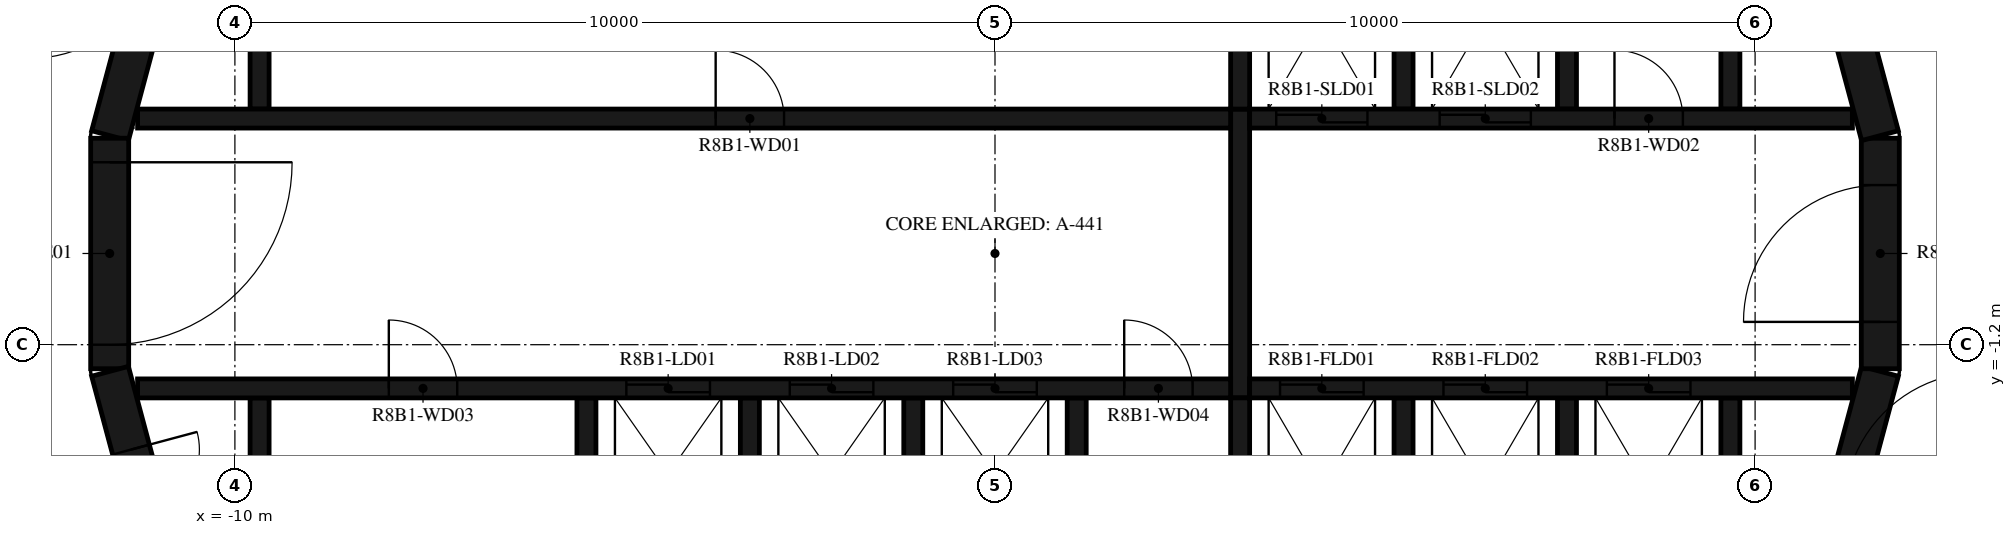
"""IFC4 building model, lengths in metres.
Left out: names, types, materials, properties, quantities, classifications, styles, units other than length and angle.
Written with IfcOpenShell. Run it as: python <this file> out.ifc"""

import sys

from ifc_helpers import new_model, si_unit, direction, frame, frame_2d, origin, place, context, subcontext, project, spatial, polyline, rectangle, outline, extrude, element, fill, save


model = new_model("IFC4")
c1 = context("Model", 3, precision=1e-05, world=origin(), true_north=direction((0.0, 1.0)))
c2 = subcontext(c1, "Body", "Model", "MODEL_VIEW")
j1 = project(units=[si_unit("LENGTHUNIT", "METRE"), si_unit("PLANEANGLEUNIT", "RADIAN")], contexts=[c1])
p1 = place(None, origin())
s1 = spatial("IfcSite", under=j1, at=p1, CompositionType="ELEMENT")
p2 = place(p1, origin())
s2 = spatial("IfcBuilding", under=s1, at=p2, CompositionType="ELEMENT")
p3 = place(p2, frame((0.0, 0.0, 308.7)))
s3 = spatial("IfcBuildingStorey", under=s2, at=p3, CompositionType="ELEMENT", Elevation=308.7)
p4 = place(p3, frame((10.858, -4.479, 0.0), z_axis=(0.0, 0.0, 1.0), x_axis=(0.258734743916, 0.965948410781, 0.0)))
e1 = element("IfcWall", 1, at=p4, inside=s3, PredefinedType="SHEAR", context=c2, shape_type="SweptSolid", body=[
    extrude(rectangle(XDim=3.033, YDim=0.5, at=frame_2d((1.516, 0.0))), origin(), (0.0, 0.0, 1.0), 3.12),
])
p5 = place(p3, frame((11.647, -1.516, 0.0), z_axis=(0.0, 0.0, 1.0), x_axis=(0.0, 1.0, 0.0)))
e2 = element("IfcWall", 2, at=p5, inside=s3, PredefinedType="SHEAR", context=c2, shape_type="SweptSolid", body=[
    extrude(rectangle(XDim=3.033, YDim=0.5, at=frame_2d((1.516, 0.0))), origin(), (0.0, 0.0, 1.0), 3.12),
])
p6 = place(p5, frame((0.616, 0.0, 0.0)))
e3 = element("IfcOpeningElement", 3, at=p6, cuts=e2, PredefinedType="OPENING", context=c2, shape_type="SweptSolid", body=[
    extrude(rectangle(XDim=1.8, YDim=2.1, at=frame_2d((0.9, 1.05))), frame((0.0, 0.26, 0.0), z_axis=(0.0, -1.0, 0.0), x_axis=(1.0, 0.0, 0.0)), (0.0, 0.0, 1.0), 0.52),
])
for number, where, z_axis, x_axis in (
    (4, (11.643, 1.55, 0.0), (0.0, 0.0, 1.0), (-0.259, 0.966, 0.0)),
    (5, (-10.858, 4.479, 0.0), (0.0, 0.0, 1.0), (-0.259, -0.966, 0.0)),
):
    element("IfcWall", number, at=place(p3, frame(where, z_axis=z_axis, x_axis=x_axis)), inside=s3, PredefinedType="SHEAR", context=c2, shape_type="SweptSolid", body=[
        extrude(rectangle(XDim=3.033, YDim=0.5, at=frame_2d((1.516, 0.0))), origin(), (0.0, 0.0, 1.0), 3.12),
    ])
p7 = place(p3, frame((-11.647, 1.516, 0.0), z_axis=(0.0, 0.0, 1.0), x_axis=(0.0, -1.0, 0.0)))
e6 = element("IfcWall", 6, at=p7, inside=s3, PredefinedType="SHEAR", context=c2, shape_type="SweptSolid", body=[
    extrude(rectangle(XDim=3.033, YDim=0.5, at=frame_2d((1.516, 0.0))), origin(), (0.0, 0.0, 1.0), 3.12),
])
p8 = place(p7, frame((0.316, 0.0, 0.0)))
e7 = element("IfcOpeningElement", 7, at=p8, cuts=e6, PredefinedType="OPENING", context=c2, shape_type="SweptSolid", body=[
    extrude(rectangle(XDim=2.4, YDim=2.1, at=frame_2d((1.2, 1.05))), frame((0.0, 0.26, 0.0), z_axis=(0.0, -1.0, 0.0), x_axis=(1.0, 0.0, 0.0)), (0.0, 0.0, 1.0), 0.52),
])
p9 = place(p3, frame((-11.643, -1.55, 0.0), z_axis=(0.0, 0.0, 1.0), x_axis=(0.258734743916, -0.965948410781, 0.0)))
e8 = element("IfcWall", 8, at=p9, inside=s3, PredefinedType="SHEAR", context=c2, shape_type="SweptSolid", body=[
    extrude(rectangle(XDim=3.033, YDim=0.5, at=frame_2d((1.516, 0.0))), origin(), (0.0, 0.0, 1.0), 3.12),
])
p10 = place(p9, frame((1.066, 0.0, 0.0)))
e9 = element("IfcOpeningElement", 9, at=p10, cuts=e8, PredefinedType="OPENING", context=c2, shape_type="SweptSolid", body=[
    extrude(rectangle(XDim=0.9, YDim=2.1, at=frame_2d((0.45, 1.05))), frame((0.0, 0.26, 0.0), z_axis=(0.0, -1.0, 0.0), x_axis=(1.0, 0.0, 0.0)), (0.0, 0.0, 1.0), 0.52),
])
p11 = place(p3, origin())
e10 = element("IfcWall", 10, at=p11, inside=s3, PredefinedType="SHEAR", context=c2, shape_type="SweptSolid", body=[
    extrude(outline(polyline([(-9.8, 1.9), (-9.55, 1.9), (-9.55, 4.8), (3.1, 4.8), (3.1, 1.9), (3.35, 1.9), (3.35, 4.8), (5.25, 4.8), (5.25, 1.9), (5.5, 1.9), (5.5, 4.8), (7.4, 4.8), (7.4, 1.9), (7.65, 1.9), (7.65, 4.8), (9.55, 4.8), (9.55, 1.9), (9.8, 1.9), (9.8, 4.8), (9.8, 5.05), (-9.8, 5.05), (-9.8, 4.8), (-9.8, 1.9)])), origin(), (0.0, 0.0, 1.0), 3.12),
])
p12 = place(p3, origin())
e11 = element("IfcWall", 11, at=p12, inside=s3, PredefinedType="SHEAR", context=c2, shape_type="SweptSolid", body=[
    extrude(outline(polyline([(9.8, -5.05), (9.8, -4.8), (9.8, -1.9), (9.55, -1.9), (9.55, -4.8), (7.65, -4.8), (7.65, -1.9), (7.4, -1.9), (7.4, -4.8), (5.5, -4.8), (5.5, -1.9), (5.25, -1.9), (5.25, -4.8), (3.35, -4.8), (3.35, -1.9), (3.1, -1.9), (3.1, -4.8), (1.2, -4.8), (1.2, -1.9), (0.95, -1.9), (0.95, -4.8), (-0.95, -4.8), (-0.95, -1.9), (-1.2, -1.9), (-1.2, -4.8), (-3.1, -4.8), (-3.1, -1.9), (-3.35, -1.9), (-3.35, -4.8), (-5.25, -4.8), (-5.25, -1.9), (-5.5, -1.9), (-5.5, -4.8), (-9.55, -4.8), (-9.55, -1.9), (-9.8, -1.9), (-9.8, -4.8), (-9.8, -5.05), (9.8, -5.05)])), origin(), (0.0, 0.0, 1.0), 3.12),
])
p13 = place(p3, frame((-11.28, 1.775, 0.0), z_axis=(0.0, 0.0, 1.0), x_axis=(1.0, 0.0, 0.0)))
e12 = element("IfcWall", 12, at=p13, inside=s3, PredefinedType="SHEAR", context=c2, shape_type="SweptSolid", body=[
    extrude(rectangle(XDim=14.38, YDim=0.25, at=frame_2d((7.19, 0.0))), origin(), (0.0, 0.0, 1.0), 3.12),
])
p14 = place(p13, frame((7.605, 0.0, 0.0)))
e13 = element("IfcOpeningElement", 13, at=p14, cuts=e12, PredefinedType="OPENING", context=c2, shape_type="SweptSolid", body=[
    extrude(rectangle(XDim=0.9, YDim=2.1, at=frame_2d((0.45, 1.05))), frame((0.0, 0.135, 0.0), z_axis=(0.0, -1.0, 0.0), x_axis=(1.0, 0.0, 0.0)), (0.0, 0.0, 1.0), 0.27),
])
p15 = place(p3, frame((3.35, 1.775, 0.0), z_axis=(0.0, 0.0, 1.0), x_axis=(1.0, 0.0, 0.0)))
e14 = element("IfcWall", 14, at=p15, inside=s3, PredefinedType="SHEAR", context=c2, shape_type="SweptSolid", body=[
    extrude(rectangle(XDim=7.93, YDim=0.25, at=frame_2d((3.965, 0.0))), origin(), (0.0, 0.0, 1.0), 3.12),
])
p16 = place(p15, frame((0.35, 0.0, 0.0)))
e15 = element("IfcOpeningElement", 15, at=p16, cuts=e14, PredefinedType="OPENING", context=c2, shape_type="SweptSolid", body=[
    extrude(rectangle(XDim=1.2, YDim=2.4, at=frame_2d((0.6, 1.2))), frame((0.0, 0.135, 0.0), z_axis=(0.0, -1.0, 0.0), x_axis=(1.0, 0.0, 0.0)), (0.0, 0.0, 1.0), 0.27),
])
p17 = place(p15, frame((2.5, 0.0, 0.0)))
e16 = element("IfcOpeningElement", 16, at=p17, cuts=e14, PredefinedType="OPENING", context=c2, shape_type="SweptSolid", body=[
    extrude(rectangle(XDim=1.2, YDim=2.4, at=frame_2d((0.6, 1.2))), frame((0.0, 0.135, 0.0), z_axis=(0.0, -1.0, 0.0), x_axis=(1.0, 0.0, 0.0)), (0.0, 0.0, 1.0), 0.27),
])
p18 = place(p15, frame((4.8, 0.0, 0.0)))
e17 = element("IfcOpeningElement", 17, at=p18, cuts=e14, PredefinedType="OPENING", context=c2, shape_type="SweptSolid", body=[
    extrude(rectangle(XDim=0.9, YDim=2.1, at=frame_2d((0.45, 1.05))), frame((0.0, 0.135, 0.0), z_axis=(0.0, -1.0, 0.0), x_axis=(1.0, 0.0, 0.0)), (0.0, 0.0, 1.0), 0.27),
])
p19 = place(p3, frame((-11.28, -1.775, 0.0), z_axis=(0.0, 0.0, 1.0), x_axis=(1.0, 0.0, 0.0)))
e18 = element("IfcWall", 18, at=p19, inside=s3, PredefinedType="SHEAR", context=c2, shape_type="SweptSolid", body=[
    extrude(rectangle(XDim=14.38, YDim=0.25, at=frame_2d((7.19, 0.0))), origin(), (0.0, 0.0, 1.0), 3.12),
])
p20 = place(p19, frame((6.43, 0.0, 0.0)))
e19 = element("IfcOpeningElement", 19, at=p20, cuts=e18, PredefinedType="OPENING", context=c2, shape_type="SweptSolid", body=[
    extrude(rectangle(XDim=1.1, YDim=2.1, at=frame_2d((0.55, 1.05))), frame((0.0, 0.135, 0.0), z_axis=(0.0, -1.0, 0.0), x_axis=(1.0, 0.0, 0.0)), (0.0, 0.0, 1.0), 0.27),
])
p21 = place(p19, frame((8.58, 0.0, 0.0)))
e20 = element("IfcOpeningElement", 20, at=p21, cuts=e18, PredefinedType="OPENING", context=c2, shape_type="SweptSolid", body=[
    extrude(rectangle(XDim=1.1, YDim=2.1, at=frame_2d((0.55, 1.05))), frame((0.0, 0.135, 0.0), z_axis=(0.0, -1.0, 0.0), x_axis=(1.0, 0.0, 0.0)), (0.0, 0.0, 1.0), 0.27),
])
p22 = place(p19, frame((10.73, 0.0, 0.0)))
e21 = element("IfcOpeningElement", 21, at=p22, cuts=e18, PredefinedType="OPENING", context=c2, shape_type="SweptSolid", body=[
    extrude(rectangle(XDim=1.1, YDim=2.1, at=frame_2d((0.55, 1.05))), frame((0.0, 0.135, 0.0), z_axis=(0.0, -1.0, 0.0), x_axis=(1.0, 0.0, 0.0)), (0.0, 0.0, 1.0), 0.27),
])
p23 = place(p19, frame((3.305, 0.0, 0.0)))
e22 = element("IfcOpeningElement", 22, at=p23, cuts=e18, PredefinedType="OPENING", context=c2, shape_type="SweptSolid", body=[
    extrude(rectangle(XDim=0.9, YDim=2.1, at=frame_2d((0.45, 1.05))), frame((0.0, 0.135, 0.0), z_axis=(0.0, -1.0, 0.0), x_axis=(1.0, 0.0, 0.0)), (0.0, 0.0, 1.0), 0.27),
])
p24 = place(p19, frame((12.98, 0.0, 0.0)))
e23 = element("IfcOpeningElement", 23, at=p24, cuts=e18, PredefinedType="OPENING", context=c2, shape_type="SweptSolid", body=[
    extrude(rectangle(XDim=0.9, YDim=2.1, at=frame_2d((0.45, 1.05))), frame((0.0, 0.135, 0.0), z_axis=(0.0, -1.0, 0.0), x_axis=(1.0, 0.0, 0.0)), (0.0, 0.0, 1.0), 0.27),
])
p25 = place(p3, frame((3.35, -1.775, 0.0), z_axis=(0.0, 0.0, 1.0), x_axis=(1.0, 0.0, 0.0)))
e24 = element("IfcWall", 24, at=p25, inside=s3, PredefinedType="SHEAR", context=c2, shape_type="SweptSolid", body=[
    extrude(rectangle(XDim=7.93, YDim=0.25, at=frame_2d((3.965, 0.0))), origin(), (0.0, 0.0, 1.0), 3.12),
])
p26 = place(p25, frame((0.4, 0.0, 0.0)))
e25 = element("IfcOpeningElement", 25, at=p26, cuts=e24, PredefinedType="OPENING", context=c2, shape_type="SweptSolid", body=[
    extrude(rectangle(XDim=1.1, YDim=2.4, at=frame_2d((0.55, 1.2))), frame((0.0, 0.135, 0.0), z_axis=(0.0, -1.0, 0.0), x_axis=(1.0, 0.0, 0.0)), (0.0, 0.0, 1.0), 0.27),
])
p27 = place(p25, frame((2.55, 0.0, 0.0)))
e26 = element("IfcOpeningElement", 26, at=p27, cuts=e24, PredefinedType="OPENING", context=c2, shape_type="SweptSolid", body=[
    extrude(rectangle(XDim=1.1, YDim=2.4, at=frame_2d((0.55, 1.2))), frame((0.0, 0.135, 0.0), z_axis=(0.0, -1.0, 0.0), x_axis=(1.0, 0.0, 0.0)), (0.0, 0.0, 1.0), 0.27),
])
p28 = place(p25, frame((4.7, 0.0, 0.0)))
e27 = element("IfcOpeningElement", 27, at=p28, cuts=e24, PredefinedType="OPENING", context=c2, shape_type="SweptSolid", body=[
    extrude(rectangle(XDim=1.1, YDim=2.4, at=frame_2d((0.55, 1.2))), frame((0.0, 0.135, 0.0), z_axis=(0.0, -1.0, 0.0), x_axis=(1.0, 0.0, 0.0)), (0.0, 0.0, 1.0), 0.27),
])
p29 = place(p3, frame((3.225, -1.9, 0.0), z_axis=(0.0, 0.0, 1.0), x_axis=(0.0, 1.0, 0.0)))
e28 = element("IfcWall", 28, at=p29, inside=s3, PredefinedType="SHEAR", context=c2, shape_type="SweptSolid", body=[
    extrude(rectangle(XDim=3.8, YDim=0.25, at=frame_2d((1.9, 0.0))), origin(), (0.0, 0.0, 1.0), 3.12),
])
p30 = place(p3, frame((12.074, -6.831, 0.0), z_axis=(0.0, 0.0, 1.0), x_axis=(0.250391063186, 0.968144780225, 0.0)))
e29 = element("IfcWall", 29, at=p30, inside=s3, PredefinedType="STANDARD", context=c2, shape_type="SweptSolid", body=[
    extrude(rectangle(XDim=7.181, YDim=0.2, at=frame_2d((3.591, 0.0))), origin(), (0.0, 0.0, 1.0), 3.12),
])
p31 = place(p30, frame((3.581, 0.0, 0.0)))
e30 = element("IfcOpeningElement", 30, at=p31, cuts=e29, PredefinedType="OPENING", context=c2, shape_type="SweptSolid", body=[
    extrude(rectangle(XDim=1.8, YDim=2.1, at=frame_2d((0.9, 1.05))), frame((0.0, 0.11, 0.0), z_axis=(0.0, -1.0, 0.0), x_axis=(1.0, 0.0, 0.0)), (0.0, 0.0, 1.0), 0.22),
])
p32 = place(p3, frame((-12.074, 6.831, 0.0), z_axis=(0.0, 0.0, 1.0), x_axis=(-0.250391063186, -0.968144780225, 0.0)))
e31 = element("IfcWall", 31, at=p32, inside=s3, PredefinedType="STANDARD", context=c2, shape_type="SweptSolid", body=[
    extrude(rectangle(XDim=7.181, YDim=0.2, at=frame_2d((3.591, 0.0))), origin(), (0.0, 0.0, 1.0), 3.12),
])
p33 = place(p32, frame((2.548, 0.0, 0.0)))
e32 = element("IfcOpeningElement", 32, at=p33, cuts=e31, PredefinedType="OPENING", context=c2, shape_type="SweptSolid", body=[
    extrude(rectangle(XDim=1.8, YDim=2.1, at=frame_2d((0.9, 1.05))), frame((0.0, 0.11, 0.0), z_axis=(0.0, -1.0, 0.0), x_axis=(1.0, 0.0, 0.0)), (0.0, 0.0, 1.0), 0.22),
])
p34 = place(p3, frame((-13.872, -0.121, 0.0), z_axis=(0.0, 0.0, 1.0), x_axis=(0.267254575108, -0.963625960674, 0.0)))
e33 = element("IfcWall", 33, at=p34, inside=s3, PredefinedType="STANDARD", context=c2, shape_type="SweptSolid", body=[
    extrude(rectangle(XDim=7.181, YDim=0.2, at=frame_2d((3.591, 0.0))), origin(), (0.0, 0.0, 1.0), 3.12),
])
p35 = place(p8, origin())
e34 = element("IfcDoor", 34, at=p35, inside=s3, OperationType="DOUBLE_DOOR_SINGLE_SWING", PredefinedType="DOOR", context=c2, shape_type="SweptSolid", body=[
    extrude(rectangle(XDim=2.4, YDim=2.1, at=frame_2d((1.2, 1.05))), frame((0.0, 0.025, 0.0), z_axis=(0.0, -1.0, 0.0), x_axis=(1.0, 0.0, 0.0)), (0.0, 0.0, 1.0), 0.05),
])
fill(e7, e34)
p36 = place(p6, origin())
e35 = element("IfcDoor", 35, at=p36, inside=s3, OperationType="DOUBLE_DOOR_SINGLE_SWING", PredefinedType="DOOR", context=c2, shape_type="SweptSolid", body=[
    extrude(rectangle(XDim=1.8, YDim=2.1, at=frame_2d((0.9, 1.05))), frame((0.0, 0.025, 0.0), z_axis=(0.0, -1.0, 0.0), x_axis=(1.0, 0.0, 0.0)), (0.0, 0.0, 1.0), 0.05),
])
fill(e3, e35)
p37 = place(p16, origin())
e36 = element("IfcDoor", 36, at=p37, inside=s3, OperationType="DOUBLE_DOOR_SLIDING", PredefinedType="DOOR", context=c2, shape_type="SweptSolid", body=[
    extrude(rectangle(XDim=1.2, YDim=2.4, at=frame_2d((0.6, 1.2))), frame((0.0, 0.025, 0.0), z_axis=(0.0, -1.0, 0.0), x_axis=(1.0, 0.0, 0.0)), (0.0, 0.0, 1.0), 0.05),
])
fill(e15, e36)
p38 = place(p17, origin())
e37 = element("IfcDoor", 37, at=p38, inside=s3, OperationType="DOUBLE_DOOR_SLIDING", PredefinedType="DOOR", context=c2, shape_type="SweptSolid", body=[
    extrude(rectangle(XDim=1.2, YDim=2.4, at=frame_2d((0.6, 1.2))), frame((0.0, 0.025, 0.0), z_axis=(0.0, -1.0, 0.0), x_axis=(1.0, 0.0, 0.0)), (0.0, 0.0, 1.0), 0.05),
])
fill(e16, e37)
p39 = place(p20, origin())
e38 = element("IfcDoor", 38, at=p39, inside=s3, OperationType="DOUBLE_DOOR_SLIDING", PredefinedType="DOOR", context=c2, shape_type="SweptSolid", body=[
    extrude(rectangle(XDim=1.1, YDim=2.1, at=frame_2d((0.55, 1.05))), frame((0.0, 0.025, 0.0), z_axis=(0.0, -1.0, 0.0), x_axis=(1.0, 0.0, 0.0)), (0.0, 0.0, 1.0), 0.05),
])
fill(e19, e38)
p40 = place(p21, origin())
e39 = element("IfcDoor", 39, at=p40, inside=s3, OperationType="DOUBLE_DOOR_SLIDING", PredefinedType="DOOR", context=c2, shape_type="SweptSolid", body=[
    extrude(rectangle(XDim=1.1, YDim=2.1, at=frame_2d((0.55, 1.05))), frame((0.0, 0.025, 0.0), z_axis=(0.0, -1.0, 0.0), x_axis=(1.0, 0.0, 0.0)), (0.0, 0.0, 1.0), 0.05),
])
fill(e20, e39)
p41 = place(p22, origin())
e40 = element("IfcDoor", 40, at=p41, inside=s3, OperationType="DOUBLE_DOOR_SLIDING", PredefinedType="DOOR", context=c2, shape_type="SweptSolid", body=[
    extrude(rectangle(XDim=1.1, YDim=2.1, at=frame_2d((0.55, 1.05))), frame((0.0, 0.025, 0.0), z_axis=(0.0, -1.0, 0.0), x_axis=(1.0, 0.0, 0.0)), (0.0, 0.0, 1.0), 0.05),
])
fill(e21, e40)
p42 = place(p26, origin())
e41 = element("IfcDoor", 41, at=p42, inside=s3, OperationType="DOUBLE_DOOR_SLIDING", PredefinedType="DOOR", context=c2, shape_type="SweptSolid", body=[
    extrude(rectangle(XDim=1.1, YDim=2.4, at=frame_2d((0.55, 1.2))), frame((0.0, 0.025, 0.0), z_axis=(0.0, -1.0, 0.0), x_axis=(1.0, 0.0, 0.0)), (0.0, 0.0, 1.0), 0.05),
])
fill(e25, e41)
p43 = place(p27, origin())
e42 = element("IfcDoor", 42, at=p43, inside=s3, OperationType="DOUBLE_DOOR_SLIDING", PredefinedType="DOOR", context=c2, shape_type="SweptSolid", body=[
    extrude(rectangle(XDim=1.1, YDim=2.4, at=frame_2d((0.55, 1.2))), frame((0.0, 0.025, 0.0), z_axis=(0.0, -1.0, 0.0), x_axis=(1.0, 0.0, 0.0)), (0.0, 0.0, 1.0), 0.05),
])
fill(e26, e42)
p44 = place(p28, origin())
e43 = element("IfcDoor", 43, at=p44, inside=s3, OperationType="DOUBLE_DOOR_SLIDING", PredefinedType="DOOR", context=c2, shape_type="SweptSolid", body=[
    extrude(rectangle(XDim=1.1, YDim=2.4, at=frame_2d((0.55, 1.2))), frame((0.0, 0.025, 0.0), z_axis=(0.0, -1.0, 0.0), x_axis=(1.0, 0.0, 0.0)), (0.0, 0.0, 1.0), 0.05),
])
fill(e27, e43)
p45 = place(p14, origin())
e44 = element("IfcDoor", 44, at=p45, inside=s3, OperationType="SINGLE_SWING_LEFT", PredefinedType="DOOR", context=c2, shape_type="SweptSolid", body=[
    extrude(rectangle(XDim=0.9, YDim=2.1, at=frame_2d((0.45, 1.05))), frame((0.0, 0.025, 0.0), z_axis=(0.0, -1.0, 0.0), x_axis=(1.0, 0.0, 0.0)), (0.0, 0.0, 1.0), 0.05),
])
fill(e13, e44)
p46 = place(p18, origin())
e45 = element("IfcDoor", 45, at=p46, inside=s3, OperationType="SINGLE_SWING_RIGHT", PredefinedType="DOOR", context=c2, shape_type="SweptSolid", body=[
    extrude(rectangle(XDim=0.9, YDim=2.1, at=frame_2d((0.45, 1.05))), frame((0.0, 0.025, 0.0), z_axis=(0.0, -1.0, 0.0), x_axis=(1.0, 0.0, 0.0)), (0.0, 0.0, 1.0), 0.05),
])
fill(e17, e45)
p47 = place(p23, origin())
e46 = element("IfcDoor", 46, at=p47, inside=s3, OperationType="SINGLE_SWING_LEFT", PredefinedType="DOOR", context=c2, shape_type="SweptSolid", body=[
    extrude(rectangle(XDim=0.9, YDim=2.1, at=frame_2d((0.45, 1.05))), frame((0.0, 0.025, 0.0), z_axis=(0.0, -1.0, 0.0), x_axis=(1.0, 0.0, 0.0)), (0.0, 0.0, 1.0), 0.05),
])
fill(e22, e46)
p48 = place(p24, origin())
e47 = element("IfcDoor", 47, at=p48, inside=s3, OperationType="SINGLE_SWING_RIGHT", PredefinedType="DOOR", context=c2, shape_type="SweptSolid", body=[
    extrude(rectangle(XDim=0.9, YDim=2.1, at=frame_2d((0.45, 1.05))), frame((0.0, 0.025, 0.0), z_axis=(0.0, -1.0, 0.0), x_axis=(1.0, 0.0, 0.0)), (0.0, 0.0, 1.0), 0.05),
])
fill(e23, e47)
p49 = place(p10, origin())
e48 = element("IfcDoor", 48, at=p49, inside=s3, OperationType="SINGLE_SWING_LEFT", PredefinedType="DOOR", context=c2, shape_type="SweptSolid", body=[
    extrude(rectangle(XDim=0.9, YDim=2.1, at=frame_2d((0.45, 1.05))), frame((0.0, 0.025, 0.0), z_axis=(0.0, -1.0, 0.0), x_axis=(1.0, 0.0, 0.0)), (0.0, 0.0, 1.0), 0.05),
])
fill(e9, e48)
save(model, sys.argv[1])
